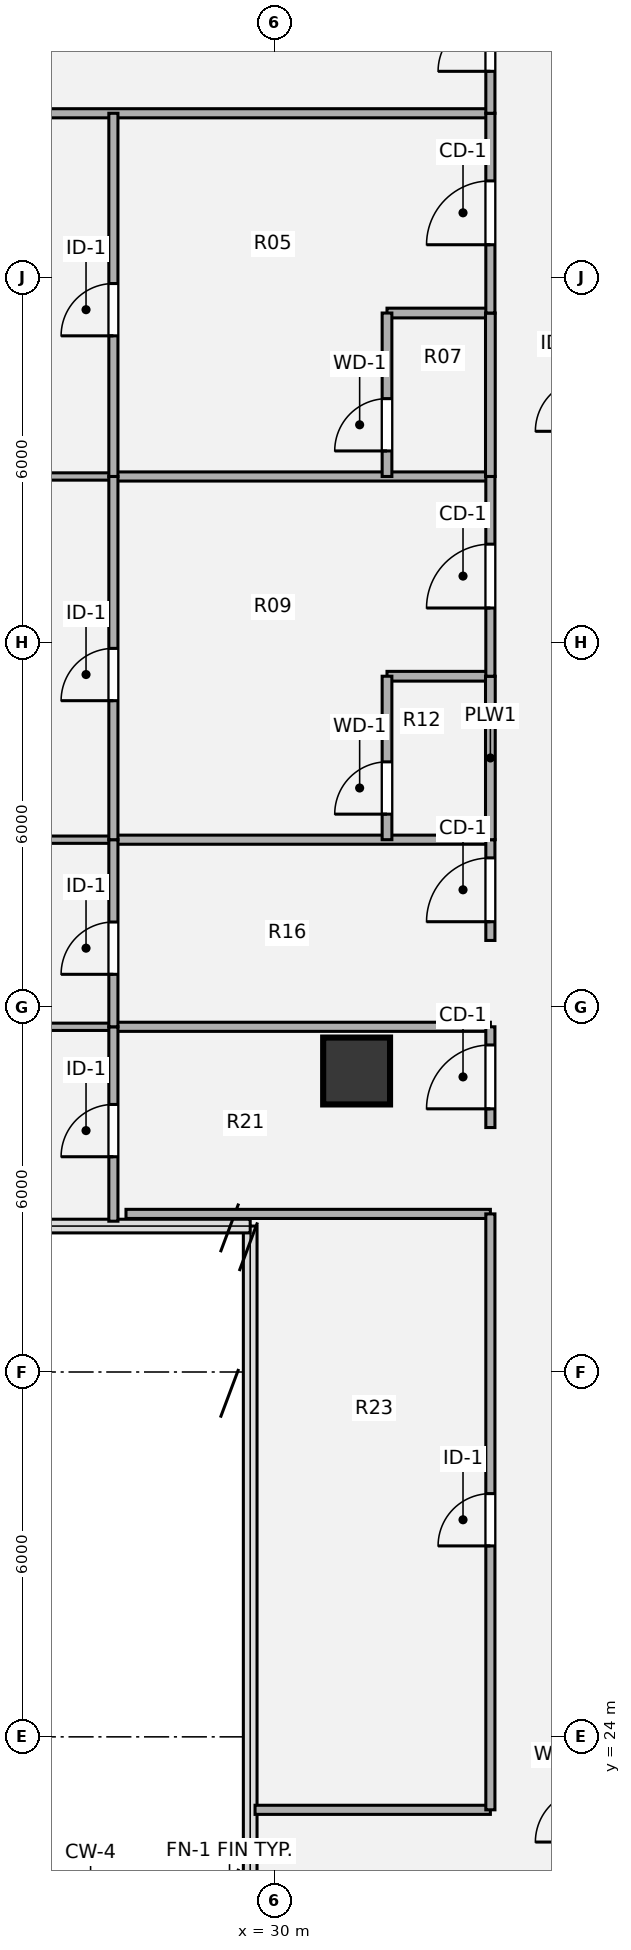
"""IFC4 building model, lengths in metres.
Left out: names, types, materials, properties, quantities, classifications, styles, units other than length and angle.
Written with IfcOpenShell. Run it as: python <this file> out.ifc"""

import sys

from ifc_helpers import new_model, si_unit, direction, frame, frame_2d, origin, origin_2d, place, context, subcontext, project, spatial, rectangle, hollow_circle, extrude, source, transform, mapped, element, fill, save


model = new_model("IFC4")
c1 = context("Model", 3, precision=1e-05, world=origin(), true_north=direction((0.0, 1.0)))
c2 = subcontext(c1, "Body", "Model", "MODEL_VIEW")
j1 = project(units=[si_unit("LENGTHUNIT", "METRE"), si_unit("PLANEANGLEUNIT", "RADIAN")], contexts=[c1])
p1 = place(None, origin())
s1 = spatial("IfcSite", under=j1, at=p1, CompositionType="ELEMENT")
p2 = place(p1, origin())
s2 = spatial("IfcBuilding", under=s1, at=p2, CompositionType="ELEMENT")
p3 = place(p2, frame((0.0, 0.0, 171.54)))
s3 = spatial("IfcBuildingStorey", under=s2, at=p3, CompositionType="ELEMENT", Elevation=171.54)
m1 = source(origin(), c2, "Body", "SweptSolid", [
    extrude(hollow_circle(Radius=0.55, WallThickness=0.04, at=origin_2d()), origin(), (0.0, 0.0, 1.0), 3.78),
])
p4 = place(p3, frame((31.35, 34.95, 0.0), z_axis=(0.0, 0.0, 1.0), x_axis=(1.0, 0.0, 0.0)))
e1 = element("IfcColumn", 1, at=p4, inside=s3, PredefinedType="COLUMN", context=c2, shape_type="MappedRepresentation", body=[
    mapped(m1, transform((0.0, 0.0, 0.0), x_axis=(1.0, 0.0, 0.0), y_axis=(0.0, 1.0, 0.0), z_axis=(0.0, 0.0, 1.0), scale=1.0)),
])
p5 = place(p3, frame((29.68, 22.8, 0.0), z_axis=(0.0, 0.0, 1.0), x_axis=(1.0, 0.0, 0.0)))
e2 = element("IfcWall", 2, at=p5, inside=s3, PredefinedType="PARTITIONING", context=c2, shape_type="SweptSolid", body=[
    extrude(rectangle(XDim=3.87, YDim=0.15, at=frame_2d((1.935, 0.0))), origin(), (0.0, 0.0, 1.0), 3.5),
])
p6 = place(p3, frame((27.557, 32.6, 0.0), z_axis=(0.0, 0.0, 1.0), x_axis=(1.0, 0.0, 0.0)))
e3 = element("IfcWall", 3, at=p6, inside=s3, PredefinedType="PARTITIONING", context=c2, shape_type="SweptSolid", body=[
    extrude(rectangle(XDim=5.993, YDim=0.15, at=frame_2d((2.997, 0.0))), origin(), (0.0, 0.0, 1.0), 3.5),
])
p7 = place(p3, frame((15.88, 35.677, 0.0), z_axis=(0.0, 0.0, 1.0), x_axis=(1.0, 0.0, 0.0)))
e4 = element("IfcWall", 4, at=p7, inside=s3, PredefinedType="PARTITIONING", context=c2, shape_type="SweptSolid", body=[
    extrude(rectangle(XDim=11.47, YDim=0.12, at=frame_2d((5.735, 0.0))), origin(), (0.0, 0.0, 1.0), 2.982),
])
p8 = place(p3, frame((27.35, 35.677, 0.0), z_axis=(0.0, 0.0, 1.0), x_axis=(1.0, 0.0, 0.0)))
e5 = element("IfcWall", 5, at=p8, inside=s3, PredefinedType="PARTITIONING", context=c2, shape_type="SweptSolid", body=[
    extrude(rectangle(XDim=6.2, YDim=0.15, at=frame_2d((3.1, 0.0))), origin(), (0.0, 0.0, 1.0), 2.982),
])
p9 = place(p3, frame((15.88, 38.754, 0.0), z_axis=(0.0, 0.0, 1.0), x_axis=(1.0, 0.0, 0.0)))
e6 = element("IfcWall", 6, at=p9, inside=s3, PredefinedType="PARTITIONING", context=c2, shape_type="SweptSolid", body=[
    extrude(rectangle(XDim=11.47, YDim=0.12, at=frame_2d((5.735, 0.0))), origin(), (0.0, 0.0, 1.0), 2.982),
])
p10 = place(p3, frame((27.35, 38.754, 0.0), z_axis=(0.0, 0.0, 1.0), x_axis=(1.0, 0.0, 0.0)))
e7 = element("IfcWall", 7, at=p10, inside=s3, PredefinedType="PARTITIONING", context=c2, shape_type="SweptSolid", body=[
    extrude(rectangle(XDim=6.2, YDim=0.15, at=frame_2d((3.1, 0.0))), origin(), (0.0, 0.0, 1.0), 2.982),
])
p11 = place(p3, frame((31.85, 41.442, 0.0), z_axis=(0.0, 0.0, 1.0), x_axis=(1.0, 0.0, 0.0)))
e8 = element("IfcWall", 8, at=p11, inside=s3, PredefinedType="PLUMBINGWALL", context=c2, shape_type="SweptSolid", body=[
    extrude(rectangle(XDim=1.7, YDim=0.16, at=frame_2d((0.85, 0.0))), origin(), (0.0, 0.0, 1.0), 3.259),
])
p12 = place(p3, frame((15.88, 44.727, 0.0), z_axis=(0.0, 0.0, 1.0), x_axis=(1.0, 0.0, 0.0)))
e9 = element("IfcWall", 9, at=p12, inside=s3, PredefinedType="PARTITIONING", context=c2, shape_type="SweptSolid", body=[
    extrude(rectangle(XDim=11.47, YDim=0.12, at=frame_2d((5.735, 0.0))), origin(), (0.0, 0.0, 1.0), 3.055),
])
p13 = place(p3, frame((27.35, 44.727, 0.0), z_axis=(0.0, 0.0, 1.0), x_axis=(1.0, 0.0, 0.0)))
e10 = element("IfcWall", 10, at=p13, inside=s3, PredefinedType="PARTITIONING", context=c2, shape_type="SweptSolid", body=[
    extrude(rectangle(XDim=6.2, YDim=0.15, at=frame_2d((3.1, 0.0))), origin(), (0.0, 0.0, 1.0), 3.055),
])
p14 = place(p3, frame((31.85, 47.415, 0.0), z_axis=(0.0, 0.0, 1.0), x_axis=(1.0, 0.0, 0.0)))
e11 = element("IfcWall", 11, at=p14, inside=s3, PredefinedType="PLUMBINGWALL", context=c2, shape_type="SweptSolid", body=[
    extrude(rectangle(XDim=1.7, YDim=0.16, at=frame_2d((0.85, 0.0))), origin(), (0.0, 0.0, 1.0), 3.259),
])
p15 = place(p3, frame((15.981, 50.7, 0.0), z_axis=(0.0, 0.0, 1.0), x_axis=(1.0, 0.0, 0.0)))
e12 = element("IfcWall", 12, at=p15, inside=s3, PredefinedType="PARTITIONING", context=c2, shape_type="SweptSolid", body=[
    extrude(rectangle(XDim=17.569, YDim=0.15, at=frame_2d((8.785, 0.0))), origin(), (0.0, 0.0, 1.0), 3.308),
])
p16 = place(p3, frame((27.35, 32.48, 0.0), z_axis=(0.0, 0.0, 1.0), x_axis=(0.0, 1.0, 0.0)))
e13 = element("IfcWall", 13, at=p16, inside=s3, PredefinedType="PARTITIONING", context=c2, shape_type="SweptSolid", body=[
    extrude(rectangle(XDim=3.197, YDim=0.15, at=frame_2d((1.599, 0.0))), origin(), (0.0, 0.0, 1.0), 3.5),
])
p17 = place(p16, frame((1.06, 0.0, 0.0)))
e14 = element("IfcOpeningElement", 14, at=p17, cuts=e13, PredefinedType="OPENING", context=c2, shape_type="SweptSolid", body=[
    extrude(rectangle(XDim=0.86, YDim=2.1, at=origin_2d()), frame((0.43, 0.085, 1.05), z_axis=(0.0, -1.0, 0.0), x_axis=(1.0, 0.0, 0.0)), (0.0, 0.0, 1.0), 0.17),
])
p18 = place(p3, frame((27.35, 35.677, 0.0), z_axis=(0.0, 0.0, 1.0), x_axis=(0.0, 1.0, 0.0)))
e15 = element("IfcWall", 15, at=p18, inside=s3, PredefinedType="PARTITIONING", context=c2, shape_type="SweptSolid", body=[
    extrude(rectangle(XDim=3.077, YDim=0.15, at=frame_2d((1.539, 0.0))), origin(), (0.0, 0.0, 1.0), 3.5),
])
p19 = place(p18, frame((0.863, 0.0, 0.0)))
e16 = element("IfcOpeningElement", 16, at=p19, cuts=e15, PredefinedType="OPENING", context=c2, shape_type="SweptSolid", body=[
    extrude(rectangle(XDim=0.86, YDim=2.1, at=origin_2d()), frame((0.43, 0.085, 1.05), z_axis=(0.0, -1.0, 0.0), x_axis=(1.0, 0.0, 0.0)), (0.0, 0.0, 1.0), 0.17),
])
p20 = place(p3, frame((27.35, 38.754, 0.0), z_axis=(0.0, 0.0, 1.0), x_axis=(0.0, 1.0, 0.0)))
e17 = element("IfcWall", 17, at=p20, inside=s3, PredefinedType="PARTITIONING", context=c2, shape_type="SweptSolid", body=[
    extrude(rectangle(XDim=5.973, YDim=0.15, at=frame_2d((2.987, 0.0))), origin(), (0.0, 0.0, 1.0), 3.5),
])
p21 = place(p20, frame((2.286, 0.0, 0.0)))
e18 = element("IfcOpeningElement", 18, at=p21, cuts=e17, PredefinedType="OPENING", context=c2, shape_type="SweptSolid", body=[
    extrude(rectangle(XDim=0.86, YDim=2.1, at=origin_2d()), frame((0.43, 0.085, 1.05), z_axis=(0.0, -1.0, 0.0), x_axis=(1.0, 0.0, 0.0)), (0.0, 0.0, 1.0), 0.17),
])
p22 = place(p3, frame((27.35, 44.727, 0.0), z_axis=(0.0, 0.0, 1.0), x_axis=(0.0, 1.0, 0.0)))
e19 = element("IfcWall", 19, at=p22, inside=s3, PredefinedType="PARTITIONING", context=c2, shape_type="SweptSolid", body=[
    extrude(rectangle(XDim=5.973, YDim=0.15, at=frame_2d((2.986, 0.0))), origin(), (0.0, 0.0, 1.0), 3.5),
])
p23 = place(p22, frame((2.313, 0.0, 0.0)))
e20 = element("IfcOpeningElement", 20, at=p23, cuts=e19, PredefinedType="OPENING", context=c2, shape_type="SweptSolid", body=[
    extrude(rectangle(XDim=0.86, YDim=2.1, at=origin_2d()), frame((0.43, 0.085, 1.05), z_axis=(0.0, -1.0, 0.0), x_axis=(1.0, 0.0, 0.0)), (0.0, 0.0, 1.0), 0.17),
])
p24 = place(p3, frame((31.85, 38.754, 0.0), z_axis=(0.0, 0.0, 1.0), x_axis=(0.0, 1.0, 0.0)))
e21 = element("IfcWall", 21, at=p24, inside=s3, PredefinedType="PLUMBINGWALL", context=c2, shape_type="SweptSolid", body=[
    extrude(rectangle(XDim=2.688, YDim=0.16, at=frame_2d((1.344, 0.0))), origin(), (0.0, 0.0, 1.0), 3.5),
])
p25 = place(p24, frame((0.42, 0.0, 0.0)))
e22 = element("IfcOpeningElement", 22, at=p25, cuts=e21, PredefinedType="OPENING", context=c2, shape_type="SweptSolid", body=[
    extrude(rectangle(XDim=0.86, YDim=2.1, at=origin_2d()), frame((0.43, 0.09, 1.05), z_axis=(0.0, -1.0, 0.0), x_axis=(1.0, 0.0, 0.0)), (0.0, 0.0, 1.0), 0.18),
])
p26 = place(p3, frame((31.85, 44.727, 0.0), z_axis=(0.0, 0.0, 1.0), x_axis=(0.0, 1.0, 0.0)))
e23 = element("IfcWall", 23, at=p26, inside=s3, PredefinedType="PLUMBINGWALL", context=c2, shape_type="SweptSolid", body=[
    extrude(rectangle(XDim=2.688, YDim=0.16, at=frame_2d((1.344, 0.0))), origin(), (0.0, 0.0, 1.0), 3.5),
])
p27 = place(p26, frame((0.42, 0.0, 0.0)))
e24 = element("IfcOpeningElement", 24, at=p27, cuts=e23, PredefinedType="OPENING", context=c2, shape_type="SweptSolid", body=[
    extrude(rectangle(XDim=0.86, YDim=2.1, at=origin_2d()), frame((0.43, 0.09, 1.05), z_axis=(0.0, -1.0, 0.0), x_axis=(1.0, 0.0, 0.0)), (0.0, 0.0, 1.0), 0.18),
])
p28 = place(p3, frame((33.55, 22.8, 0.0), z_axis=(0.0, 0.0, 1.0), x_axis=(0.0, 1.0, 0.0)))
e25 = element("IfcWall", 25, at=p28, inside=s3, PredefinedType="PARTITIONING", context=c2, shape_type="SweptSolid", body=[
    extrude(rectangle(XDim=9.8, YDim=0.15, at=frame_2d((4.9, 0.0))), origin(), (0.0, 0.0, 1.0), 3.5),
])
p29 = place(p28, frame((4.34, 0.0, 0.0)))
e26 = element("IfcOpeningElement", 26, at=p29, cuts=e25, PredefinedType="OPENING", context=c2, shape_type="SweptSolid", body=[
    extrude(rectangle(XDim=0.86, YDim=2.1, at=origin_2d()), frame((0.43, 0.085, 1.05), z_axis=(0.0, -1.0, 0.0), x_axis=(1.0, 0.0, 0.0)), (0.0, 0.0, 1.0), 0.17),
])
p30 = place(p3, frame((33.55, 34.02, 0.0), z_axis=(0.0, 0.0, 1.0), x_axis=(0.0, 1.0, 0.0)))
e27 = element("IfcWall", 27, at=p30, inside=s3, PredefinedType="PARTITIONING", context=c2, shape_type="SweptSolid", body=[
    extrude(rectangle(XDim=1.657, YDim=0.15, at=frame_2d((0.829, 0.0))), origin(), (0.0, 0.0, 1.0), 3.5),
])
p31 = place(p30, frame((0.308, 0.0, 0.0)))
e28 = element("IfcOpeningElement", 28, at=p31, cuts=e27, PredefinedType="OPENING", context=c2, shape_type="SweptSolid", body=[
    extrude(rectangle(XDim=1.05, YDim=2.1, at=origin_2d()), frame((0.525, 0.085, 1.05), z_axis=(0.0, -1.0, 0.0), x_axis=(1.0, 0.0, 0.0)), (0.0, 0.0, 1.0), 0.17),
])
p32 = place(p3, frame((33.55, 37.097, 0.0), z_axis=(0.0, 0.0, 1.0), x_axis=(0.0, 1.0, 0.0)))
e29 = element("IfcWall", 29, at=p32, inside=s3, PredefinedType="PARTITIONING", context=c2, shape_type="SweptSolid", body=[
    extrude(rectangle(XDim=1.657, YDim=0.15, at=frame_2d((0.829, 0.0))), origin(), (0.0, 0.0, 1.0), 3.5),
])
p33 = place(p32, frame((0.308, 0.0, 0.0)))
e30 = element("IfcOpeningElement", 30, at=p33, cuts=e29, PredefinedType="OPENING", context=c2, shape_type="SweptSolid", body=[
    extrude(rectangle(XDim=1.05, YDim=2.1, at=origin_2d()), frame((0.525, 0.085, 1.05), z_axis=(0.0, -1.0, 0.0), x_axis=(1.0, 0.0, 0.0)), (0.0, 0.0, 1.0), 0.17),
])
p34 = place(p3, frame((33.55, 38.754, 0.0), z_axis=(0.0, 0.0, 1.0), x_axis=(0.0, 1.0, 0.0)))
e31 = element("IfcWall", 31, at=p34, inside=s3, PredefinedType="PLUMBINGWALL", context=c2, shape_type="SweptSolid", body=[
    extrude(rectangle(XDim=2.688, YDim=0.16, at=frame_2d((1.344, 0.0))), origin(), (0.0, 0.0, 1.0), 3.5),
])
p35 = place(p3, frame((33.55, 41.442, 0.0), z_axis=(0.0, 0.0, 1.0), x_axis=(0.0, 1.0, 0.0)))
e32 = element("IfcWall", 32, at=p35, inside=s3, PredefinedType="PARTITIONING", context=c2, shape_type="SweptSolid", body=[
    extrude(rectangle(XDim=3.285, YDim=0.15, at=frame_2d((1.643, 0.0))), origin(), (0.0, 0.0, 1.0), 3.5),
])
p36 = place(p35, frame((1.122, 0.0, 0.0)))
e33 = element("IfcOpeningElement", 33, at=p36, cuts=e32, PredefinedType="OPENING", context=c2, shape_type="SweptSolid", body=[
    extrude(rectangle(XDim=1.05, YDim=2.1, at=origin_2d()), frame((0.525, 0.085, 1.05), z_axis=(0.0, -1.0, 0.0), x_axis=(1.0, 0.0, 0.0)), (0.0, 0.0, 1.0), 0.17),
])
p37 = place(p3, frame((33.55, 44.727, 0.0), z_axis=(0.0, 0.0, 1.0), x_axis=(0.0, 1.0, 0.0)))
e34 = element("IfcWall", 34, at=p37, inside=s3, PredefinedType="PLUMBINGWALL", context=c2, shape_type="SweptSolid", body=[
    extrude(rectangle(XDim=2.688, YDim=0.16, at=frame_2d((1.344, 0.0))), origin(), (0.0, 0.0, 1.0), 3.5),
])
p38 = place(p3, frame((33.55, 47.415, 0.0), z_axis=(0.0, 0.0, 1.0), x_axis=(0.0, 1.0, 0.0)))
e35 = element("IfcWall", 35, at=p38, inside=s3, PredefinedType="PARTITIONING", context=c2, shape_type="SweptSolid", body=[
    extrude(rectangle(XDim=3.285, YDim=0.15, at=frame_2d((1.643, 0.0))), origin(), (0.0, 0.0, 1.0), 3.5),
])
p39 = place(p38, frame((1.123, 0.0, 0.0)))
e36 = element("IfcOpeningElement", 36, at=p39, cuts=e35, PredefinedType="OPENING", context=c2, shape_type="SweptSolid", body=[
    extrude(rectangle(XDim=1.05, YDim=2.1, at=origin_2d()), frame((0.525, 0.085, 1.05), z_axis=(0.0, -1.0, 0.0), x_axis=(1.0, 0.0, 0.0)), (0.0, 0.0, 1.0), 0.17),
])
p40 = place(p3, frame((33.55, 50.7, 0.0), z_axis=(0.0, 0.0, 1.0), x_axis=(0.0, 1.0, 0.0)))
e37 = element("IfcWall", 37, at=p40, inside=s3, PredefinedType="PARTITIONING", context=c2, shape_type="SweptSolid", body=[
    extrude(rectangle(XDim=2.3, YDim=0.15, at=frame_2d((1.15, 0.0))), origin(), (0.0, 0.0, 1.0), 3.5),
])
p41 = place(p40, frame((0.69, 0.0, 0.0)))
e38 = element("IfcOpeningElement", 38, at=p41, cuts=e37, PredefinedType="OPENING", context=c2, shape_type="SweptSolid", body=[
    extrude(rectangle(XDim=0.86, YDim=2.1, at=origin_2d()), frame((0.43, 0.085, 1.05), z_axis=(0.0, -1.0, 0.0), x_axis=(1.0, 0.0, 0.0)), (0.0, 0.0, 1.0), 0.17),
])
m2 = source(origin(), c2, "Body", "SweptSolid", [
    extrude(rectangle(XDim=0.86, YDim=2.1, at=origin_2d()), frame((0.43, 0.025, 1.05), z_axis=(0.0, -1.0, 0.0), x_axis=(1.0, 0.0, 0.0)), (0.0, 0.0, 1.0), 0.05),
])
p42 = place(p17, origin())
e39 = element("IfcDoor", 39, at=p42, inside=s3, OperationType="SINGLE_SWING_LEFT", PredefinedType="DOOR", context=c2, shape_type="MappedRepresentation", body=[
    mapped(m2, transform((0.0, 0.0, 0.0), x_axis=(1.0, 0.0, 0.0), y_axis=(0.0, 1.0, 0.0), z_axis=(0.0, 0.0, 1.0), scale=1.0)),
])
fill(e14, e39)
p43 = place(p19, origin())
e40 = element("IfcDoor", 40, at=p43, inside=s3, OperationType="SINGLE_SWING_LEFT", PredefinedType="DOOR", context=c2, shape_type="MappedRepresentation", body=[
    mapped(m2, transform((0.0, 0.0, 0.0), x_axis=(1.0, 0.0, 0.0), y_axis=(0.0, 1.0, 0.0), z_axis=(0.0, 0.0, 1.0), scale=1.0)),
])
fill(e16, e40)
p44 = place(p21, origin())
e41 = element("IfcDoor", 41, at=p44, inside=s3, OperationType="SINGLE_SWING_LEFT", PredefinedType="DOOR", context=c2, shape_type="MappedRepresentation", body=[
    mapped(m2, transform((0.0, 0.0, 0.0), x_axis=(1.0, 0.0, 0.0), y_axis=(0.0, 1.0, 0.0), z_axis=(0.0, 0.0, 1.0), scale=1.0)),
])
fill(e18, e41)
p45 = place(p23, origin())
e42 = element("IfcDoor", 42, at=p45, inside=s3, OperationType="SINGLE_SWING_LEFT", PredefinedType="DOOR", context=c2, shape_type="MappedRepresentation", body=[
    mapped(m2, transform((0.0, 0.0, 0.0), x_axis=(1.0, 0.0, 0.0), y_axis=(0.0, 1.0, 0.0), z_axis=(0.0, 0.0, 1.0), scale=1.0)),
])
fill(e20, e42)
m3 = source(origin(), c2, "Body", "SweptSolid", [
    extrude(rectangle(XDim=0.86, YDim=2.1, at=origin_2d()), frame((0.43, 0.025, 1.05), z_axis=(0.0, -1.0, 0.0), x_axis=(1.0, 0.0, 0.0)), (0.0, 0.0, 1.0), 0.05),
])
p46 = place(p25, origin())
e43 = element("IfcDoor", 43, at=p46, inside=s3, OperationType="SINGLE_SWING_LEFT", PredefinedType="DOOR", context=c2, shape_type="MappedRepresentation", body=[
    mapped(m3, transform((0.0, 0.0, 0.0), x_axis=(1.0, 0.0, 0.0), y_axis=(0.0, 1.0, 0.0), z_axis=(0.0, 0.0, 1.0), scale=1.0)),
])
fill(e22, e43)
p47 = place(p27, origin())
e44 = element("IfcDoor", 44, at=p47, inside=s3, OperationType="SINGLE_SWING_LEFT", PredefinedType="DOOR", context=c2, shape_type="MappedRepresentation", body=[
    mapped(m3, transform((0.0, 0.0, 0.0), x_axis=(1.0, 0.0, 0.0), y_axis=(0.0, 1.0, 0.0), z_axis=(0.0, 0.0, 1.0), scale=1.0)),
])
fill(e24, e44)
p48 = place(p29, origin())
e45 = element("IfcDoor", 45, at=p48, inside=s3, OperationType="SINGLE_SWING_LEFT", PredefinedType="DOOR", context=c2, shape_type="MappedRepresentation", body=[
    mapped(m2, transform((0.0, 0.0, 0.0), x_axis=(1.0, 0.0, 0.0), y_axis=(0.0, 1.0, 0.0), z_axis=(0.0, 0.0, 1.0), scale=1.0)),
])
fill(e26, e45)
m4 = source(origin(), c2, "Body", "SweptSolid", [
    extrude(rectangle(XDim=1.05, YDim=2.1, at=origin_2d()), frame((0.525, 0.025, 1.05), z_axis=(0.0, -1.0, 0.0), x_axis=(1.0, 0.0, 0.0)), (0.0, 0.0, 1.0), 0.05),
])
p49 = place(p31, origin())
e46 = element("IfcDoor", 46, at=p49, inside=s3, OperationType="SINGLE_SWING_LEFT", PredefinedType="DOOR", context=c2, shape_type="MappedRepresentation", body=[
    mapped(m4, transform((0.0, 0.0, 0.0), x_axis=(1.0, 0.0, 0.0), y_axis=(0.0, 1.0, 0.0), z_axis=(0.0, 0.0, 1.0), scale=1.0)),
])
fill(e28, e46)
p50 = place(p33, origin())
e47 = element("IfcDoor", 47, at=p50, inside=s3, OperationType="SINGLE_SWING_LEFT", PredefinedType="DOOR", context=c2, shape_type="MappedRepresentation", body=[
    mapped(m4, transform((0.0, 0.0, 0.0), x_axis=(1.0, 0.0, 0.0), y_axis=(0.0, 1.0, 0.0), z_axis=(0.0, 0.0, 1.0), scale=1.0)),
])
fill(e30, e47)
p51 = place(p36, origin())
e48 = element("IfcDoor", 48, at=p51, inside=s3, OperationType="SINGLE_SWING_LEFT", PredefinedType="DOOR", context=c2, shape_type="MappedRepresentation", body=[
    mapped(m4, transform((0.0, 0.0, 0.0), x_axis=(1.0, 0.0, 0.0), y_axis=(0.0, 1.0, 0.0), z_axis=(0.0, 0.0, 1.0), scale=1.0)),
])
fill(e33, e48)
p52 = place(p39, origin())
e49 = element("IfcDoor", 49, at=p52, inside=s3, OperationType="SINGLE_SWING_LEFT", PredefinedType="DOOR", context=c2, shape_type="MappedRepresentation", body=[
    mapped(m4, transform((0.0, 0.0, 0.0), x_axis=(1.0, 0.0, 0.0), y_axis=(0.0, 1.0, 0.0), z_axis=(0.0, 0.0, 1.0), scale=1.0)),
])
fill(e36, e49)
p53 = place(p41, origin())
e50 = element("IfcDoor", 50, at=p53, inside=s3, OperationType="SINGLE_SWING_LEFT", PredefinedType="DOOR", context=c2, shape_type="MappedRepresentation", body=[
    mapped(m2, transform((0.0, 0.0, 0.0), x_axis=(1.0, 0.0, 0.0), y_axis=(0.0, 1.0, 0.0), z_axis=(0.0, 0.0, 1.0), scale=1.0)),
])
fill(e38, e50)
save(model, sys.argv[1])
